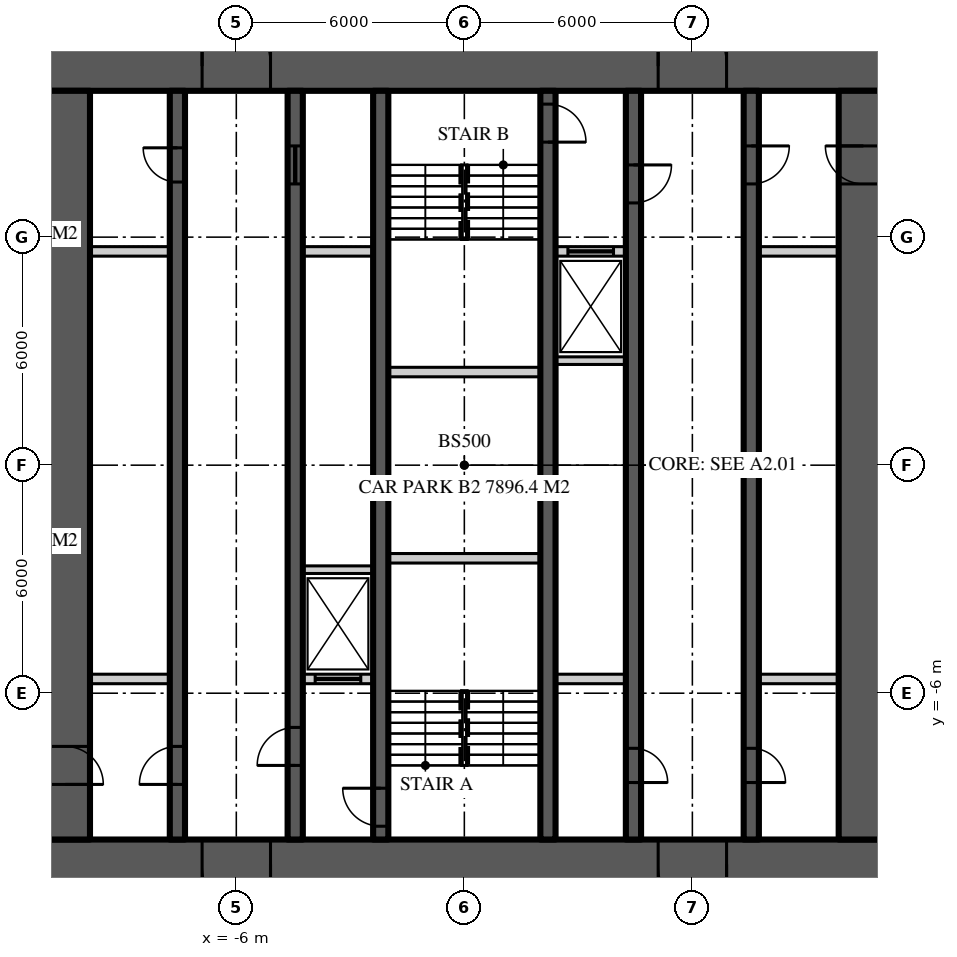
"""IFC4 building model, lengths in metres.
Left out: names, types, materials, properties, quantities, classifications, styles, units other than length and angle.
Written with IfcOpenShell. Run it as: python <this file> out.ifc"""

import sys

from ifc_helpers import new_model, si_unit, direction, frame, frame_2d, origin, place, context, subcontext, project, spatial, rectangle, extrude, element, fill, save


model = new_model("IFC4")
c1 = context("Model", 3, precision=1e-05, world=origin(), true_north=direction((0.0, 1.0)))
c2 = subcontext(c1, "Body", "Model", "MODEL_VIEW")
j1 = project(units=[si_unit("LENGTHUNIT", "METRE"), si_unit("PLANEANGLEUNIT", "RADIAN")], contexts=[c1])
p1 = place(None, origin())
s1 = spatial("IfcSite", under=j1, at=p1, CompositionType="ELEMENT")
p2 = place(p1, origin())
s2 = spatial("IfcBuilding", under=s1, at=p2, CompositionType="ELEMENT")
p3 = place(p2, frame((0.0, 0.0, -10.0)))
s3 = spatial("IfcBuildingStorey", under=s2, at=p3, CompositionType="ELEMENT", Elevation=-10.0)
p4 = place(p3, frame((-11.15, 10.5, 0.0), z_axis=(0.0, 0.0, 1.0), x_axis=(1.0, 0.0, 0.0)))
e1 = element("IfcWall", 1, at=p4, inside=s3, PredefinedType="SHEAR", context=c2, shape_type="SweptSolid", body=[
    extrude(rectangle(XDim=22.3, YDim=1.3, at=frame_2d((11.15, 0.0))), origin(), (0.0, 0.0, 1.0), 5.0),
])
p5 = place(p4, frame((4.25, 0.0, 0.0)))
e2 = element("IfcOpeningElement", 2, at=p5, cuts=e1, PredefinedType="OPENING", context=c2, shape_type="SweptSolid", body=[
    extrude(rectangle(XDim=1.8, YDim=2.2, at=frame_2d((0.9, 1.1))), frame((0.0, 0.66, 0.0), z_axis=(0.0, -1.0, 0.0), x_axis=(1.0, 0.0, 0.0)), (0.0, 0.0, 1.0), 1.32),
])
p6 = place(p4, frame((16.25, 0.0, 0.0)))
e3 = element("IfcOpeningElement", 3, at=p6, cuts=e1, PredefinedType="OPENING", context=c2, shape_type="SweptSolid", body=[
    extrude(rectangle(XDim=1.8, YDim=2.2, at=frame_2d((0.9, 1.1))), frame((0.0, 0.66, 0.0), z_axis=(0.0, -1.0, 0.0), x_axis=(1.0, 0.0, 0.0)), (0.0, 0.0, 1.0), 1.32),
])
p7 = place(p3, frame((11.15, -10.5, 0.0), z_axis=(0.0, 0.0, 1.0), x_axis=(-1.0, 0.0, 0.0)))
e4 = element("IfcWall", 4, at=p7, inside=s3, PredefinedType="SHEAR", context=c2, shape_type="SweptSolid", body=[
    extrude(rectangle(XDim=22.3, YDim=1.3, at=frame_2d((11.15, 0.0))), origin(), (0.0, 0.0, 1.0), 5.0),
])
p8 = place(p7, frame((16.25, 0.0, 0.0)))
e5 = element("IfcOpeningElement", 5, at=p8, cuts=e4, PredefinedType="OPENING", context=c2, shape_type="SweptSolid", body=[
    extrude(rectangle(XDim=1.8, YDim=2.2, at=frame_2d((0.9, 1.1))), frame((0.0, 0.66, 0.0), z_axis=(0.0, -1.0, 0.0), x_axis=(1.0, 0.0, 0.0)), (0.0, 0.0, 1.0), 1.32),
])
p9 = place(p7, frame((4.25, 0.0, 0.0)))
e6 = element("IfcOpeningElement", 6, at=p9, cuts=e4, PredefinedType="OPENING", context=c2, shape_type="SweptSolid", body=[
    extrude(rectangle(XDim=1.8, YDim=2.2, at=frame_2d((0.9, 1.1))), frame((0.0, 0.66, 0.0), z_axis=(0.0, -1.0, 0.0), x_axis=(1.0, 0.0, 0.0)), (0.0, 0.0, 1.0), 1.32),
])
p10 = place(p3, frame((10.5, -9.85, 0.0), z_axis=(0.0, 0.0, 1.0), x_axis=(0.0, 1.0, 0.0)))
e7 = element("IfcWall", 7, at=p10, inside=s3, PredefinedType="SHEAR", context=c2, shape_type="SweptSolid", body=[
    extrude(rectangle(XDim=19.7, YDim=1.3, at=frame_2d((9.85, 0.0))), origin(), (0.0, 0.0, 1.0), 5.0),
])
p11 = place(p10, frame((17.25, 0.0, 0.0)))
e8 = element("IfcOpeningElement", 8, at=p11, cuts=e7, PredefinedType="OPENING", context=c2, shape_type="SweptSolid", body=[
    extrude(rectangle(XDim=1.0, YDim=2.2, at=frame_2d((0.5, 1.1))), frame((0.0, 0.66, 0.0), z_axis=(0.0, -1.0, 0.0), x_axis=(1.0, 0.0, 0.0)), (0.0, 0.0, 1.0), 1.32),
])
p12 = place(p3, frame((-10.5, 9.85, 0.0), z_axis=(0.0, 0.0, 1.0), x_axis=(0.0, -1.0, 0.0)))
e9 = element("IfcWall", 9, at=p12, inside=s3, PredefinedType="SHEAR", context=c2, shape_type="SweptSolid", body=[
    extrude(rectangle(XDim=19.7, YDim=1.3, at=frame_2d((9.85, 0.0))), origin(), (0.0, 0.0, 1.0), 5.0),
])
p13 = place(p12, frame((17.25, 0.0, 0.0)))
e10 = element("IfcOpeningElement", 10, at=p13, cuts=e9, PredefinedType="OPENING", context=c2, shape_type="SweptSolid", body=[
    extrude(rectangle(XDim=1.0, YDim=2.2, at=frame_2d((0.5, 1.1))), frame((0.0, 0.66, 0.0), z_axis=(0.0, -1.0, 0.0), x_axis=(1.0, 0.0, 0.0)), (0.0, 0.0, 1.0), 1.32),
])
p14 = place(p3, frame((-7.55, -9.85, 0.0), z_axis=(0.0, 0.0, 1.0), x_axis=(0.0, 1.0, 0.0)))
e11 = element("IfcWall", 11, at=p14, inside=s3, PredefinedType="SHEAR", context=c2, shape_type="SweptSolid", body=[
    extrude(rectangle(XDim=19.7, YDim=0.4, at=frame_2d((9.85, 0.0))), origin(), (0.0, 0.0, 1.0), 5.0),
])
p15 = place(p14, frame((1.45, 0.0, 0.0)))
e12 = element("IfcOpeningElement", 12, at=p15, cuts=e11, PredefinedType="OPENING", context=c2, shape_type="SweptSolid", body=[
    extrude(rectangle(XDim=1.0, YDim=2.2, at=frame_2d((0.5, 1.1))), frame((0.0, 0.21, 0.0), z_axis=(0.0, -1.0, 0.0), x_axis=(1.0, 0.0, 0.0)), (0.0, 0.0, 1.0), 0.42),
])
p16 = place(p14, frame((17.3, 0.0, 0.0)))
e13 = element("IfcOpeningElement", 13, at=p16, cuts=e11, PredefinedType="OPENING", context=c2, shape_type="SweptSolid", body=[
    extrude(rectangle(XDim=0.9, YDim=2.1, at=frame_2d((0.45, 1.05))), frame((0.0, 0.21, 0.0), z_axis=(0.0, -1.0, 0.0), x_axis=(1.0, 0.0, 0.0)), (0.0, 0.0, 1.0), 0.42),
])
p17 = place(p3, frame((7.55, 9.85, 0.0), z_axis=(0.0, 0.0, 1.0), x_axis=(0.0, -1.0, 0.0)))
e14 = element("IfcWall", 14, at=p17, inside=s3, PredefinedType="SHEAR", context=c2, shape_type="SweptSolid", body=[
    extrude(rectangle(XDim=19.7, YDim=0.4, at=frame_2d((9.85, 0.0))), origin(), (0.0, 0.0, 1.0), 5.0),
])
p18 = place(p17, frame((1.45, 0.0, 0.0)))
e15 = element("IfcOpeningElement", 15, at=p18, cuts=e14, PredefinedType="OPENING", context=c2, shape_type="SweptSolid", body=[
    extrude(rectangle(XDim=1.0, YDim=2.2, at=frame_2d((0.5, 1.1))), frame((0.0, 0.21, 0.0), z_axis=(0.0, -1.0, 0.0), x_axis=(1.0, 0.0, 0.0)), (0.0, 0.0, 1.0), 0.42),
])
p19 = place(p17, frame((17.3, 0.0, 0.0)))
e16 = element("IfcOpeningElement", 16, at=p19, cuts=e14, PredefinedType="OPENING", context=c2, shape_type="SweptSolid", body=[
    extrude(rectangle(XDim=0.9, YDim=2.1, at=frame_2d((0.45, 1.05))), frame((0.0, 0.21, 0.0), z_axis=(0.0, -1.0, 0.0), x_axis=(1.0, 0.0, 0.0)), (0.0, 0.0, 1.0), 0.42),
])
p20 = place(p3, frame((-4.45, -9.85, 0.0), z_axis=(0.0, 0.0, 1.0), x_axis=(0.0, 1.0, 0.0)))
e17 = element("IfcWall", 17, at=p20, inside=s3, PredefinedType="SHEAR", context=c2, shape_type="SweptSolid", body=[
    extrude(rectangle(XDim=19.7, YDim=0.4, at=frame_2d((9.85, 0.0))), origin(), (0.0, 0.0, 1.0), 5.0),
])
p21 = place(p20, frame((1.95, 0.0, 0.0)))
e18 = element("IfcOpeningElement", 18, at=p21, cuts=e17, PredefinedType="OPENING", context=c2, shape_type="SweptSolid", body=[
    extrude(rectangle(XDim=1.0, YDim=2.2, at=frame_2d((0.5, 1.1))), frame((0.0, 0.21, 0.0), z_axis=(0.0, -1.0, 0.0), x_axis=(1.0, 0.0, 0.0)), (0.0, 0.0, 1.0), 0.42),
])
p22 = place(p20, frame((17.25, 0.0, 0.0)))
e19 = element("IfcOpeningElement", 19, at=p22, cuts=e17, PredefinedType="OPENING", context=c2, shape_type="SweptSolid", body=[
    extrude(rectangle(XDim=1.0, YDim=2.1, at=frame_2d((0.5, 1.05))), frame((0.0, 0.21, 0.0), z_axis=(0.0, -1.0, 0.0), x_axis=(1.0, 0.0, 0.0)), (0.0, 0.0, 1.0), 0.42),
])
p23 = place(p3, frame((4.45, 9.85, 0.0), z_axis=(0.0, 0.0, 1.0), x_axis=(0.0, -1.0, 0.0)))
e20 = element("IfcWall", 20, at=p23, inside=s3, PredefinedType="SHEAR", context=c2, shape_type="SweptSolid", body=[
    extrude(rectangle(XDim=19.7, YDim=0.4, at=frame_2d((9.85, 0.0))), origin(), (0.0, 0.0, 1.0), 5.0),
])
p24 = place(p23, frame((1.95, 0.0, 0.0)))
e21 = element("IfcOpeningElement", 21, at=p24, cuts=e20, PredefinedType="OPENING", context=c2, shape_type="SweptSolid", body=[
    extrude(rectangle(XDim=1.0, YDim=2.2, at=frame_2d((0.5, 1.1))), frame((0.0, 0.21, 0.0), z_axis=(0.0, -1.0, 0.0), x_axis=(1.0, 0.0, 0.0)), (0.0, 0.0, 1.0), 0.42),
])
p25 = place(p23, frame((17.3, 0.0, 0.0)))
e22 = element("IfcOpeningElement", 22, at=p25, cuts=e20, PredefinedType="OPENING", context=c2, shape_type="SweptSolid", body=[
    extrude(rectangle(XDim=0.9, YDim=2.1, at=frame_2d((0.45, 1.05))), frame((0.0, 0.21, 0.0), z_axis=(0.0, -1.0, 0.0), x_axis=(1.0, 0.0, 0.0)), (0.0, 0.0, 1.0), 0.42),
])
p26 = place(p3, frame((-2.2, -9.85, 0.0), z_axis=(0.0, 0.0, 1.0), x_axis=(0.0, 1.0, 0.0)))
e23 = element("IfcWall", 23, at=p26, inside=s3, PredefinedType="SHEAR", context=c2, shape_type="SweptSolid", body=[
    extrude(rectangle(XDim=19.7, YDim=0.4, at=frame_2d((9.85, 0.0))), origin(), (0.0, 0.0, 1.0), 5.0),
])
p27 = place(p26, frame((0.35, 0.0, 0.0)))
e24 = element("IfcOpeningElement", 24, at=p27, cuts=e23, PredefinedType="OPENING", context=c2, shape_type="SweptSolid", body=[
    extrude(rectangle(XDim=1.0, YDim=2.2, at=frame_2d((0.5, 1.1))), frame((0.0, 0.21, 0.0), z_axis=(0.0, -1.0, 0.0), x_axis=(1.0, 0.0, 0.0)), (0.0, 0.0, 1.0), 0.42),
])
p28 = place(p3, frame((2.2, 9.85, 0.0), z_axis=(0.0, 0.0, 1.0), x_axis=(0.0, -1.0, 0.0)))
e25 = element("IfcWall", 25, at=p28, inside=s3, PredefinedType="SHEAR", context=c2, shape_type="SweptSolid", body=[
    extrude(rectangle(XDim=19.7, YDim=0.4, at=frame_2d((9.85, 0.0))), origin(), (0.0, 0.0, 1.0), 5.0),
])
p29 = place(p28, frame((0.35, 0.0, 0.0)))
e26 = element("IfcOpeningElement", 26, at=p29, cuts=e25, PredefinedType="OPENING", context=c2, shape_type="SweptSolid", body=[
    extrude(rectangle(XDim=1.0, YDim=2.2, at=frame_2d((0.5, 1.1))), frame((0.0, 0.21, 0.0), z_axis=(0.0, -1.0, 0.0), x_axis=(1.0, 0.0, 0.0)), (0.0, 0.0, 1.0), 0.42),
])
p30 = place(p3, frame((-9.85, 5.625, 0.0), z_axis=(0.0, 0.0, 1.0), x_axis=(1.0, 0.0, 0.0)))
e27 = element("IfcWall", 27, at=p30, inside=s3, PredefinedType="SOLIDWALL", context=c2, shape_type="SweptSolid", body=[
    extrude(rectangle(XDim=2.1, YDim=0.25, at=frame_2d((1.05, 0.0))), origin(), (0.0, 0.0, 1.0), 4.8),
])
p31 = place(p3, frame((-4.25, 5.625, 0.0), z_axis=(0.0, 0.0, 1.0), x_axis=(1.0, 0.0, 0.0)))
e28 = element("IfcWall", 28, at=p31, inside=s3, PredefinedType="SOLIDWALL", context=c2, shape_type="SweptSolid", body=[
    extrude(rectangle(XDim=1.85, YDim=0.25, at=frame_2d((0.925, 0.0))), origin(), (0.0, 0.0, 1.0), 4.8),
])
p32 = place(p3, frame((2.4, 5.625, 0.0), z_axis=(0.0, 0.0, 1.0), x_axis=(1.0, 0.0, 0.0)))
e29 = element("IfcWall", 29, at=p32, inside=s3, PredefinedType="SOLIDWALL", context=c2, shape_type="SweptSolid", body=[
    extrude(rectangle(XDim=1.85, YDim=0.25, at=frame_2d((0.925, 0.0))), origin(), (0.0, 0.0, 1.0), 4.8),
])
p33 = place(p32, frame((0.325, 0.0, 0.0)))
e30 = element("IfcOpeningElement", 30, at=p33, cuts=e29, PredefinedType="OPENING", context=c2, shape_type="SweptSolid", body=[
    extrude(rectangle(XDim=1.2, YDim=2.2, at=frame_2d((0.6, 1.1))), frame((0.0, 0.135, 0.0), z_axis=(0.0, -1.0, 0.0), x_axis=(1.0, 0.0, 0.0)), (0.0, 0.0, 1.0), 0.27),
])
for number, where, z_axis, x_axis in (
    (31, (7.75, 5.625, 0.0), (0.0, 0.0, 1.0), (1.0, 0.0, 0.0)),
    (32, (-9.85, -5.625, 0.0), (0.0, 0.0, 1.0), (1.0, 0.0, 0.0)),
):
    element("IfcWall", number, at=place(p3, frame(where, z_axis=z_axis, x_axis=x_axis)), inside=s3, PredefinedType="SOLIDWALL", context=c2, shape_type="SweptSolid", body=[
        extrude(rectangle(XDim=2.1, YDim=0.25, at=frame_2d((1.05, 0.0))), origin(), (0.0, 0.0, 1.0), 4.8),
    ])
p34 = place(p3, frame((-4.25, -5.625, 0.0), z_axis=(0.0, 0.0, 1.0), x_axis=(1.0, 0.0, 0.0)))
e33 = element("IfcWall", 33, at=p34, inside=s3, PredefinedType="SOLIDWALL", context=c2, shape_type="SweptSolid", body=[
    extrude(rectangle(XDim=1.85, YDim=0.25, at=frame_2d((0.925, 0.0))), origin(), (0.0, 0.0, 1.0), 4.8),
])
p35 = place(p34, frame((0.325, 0.0, 0.0)))
e34 = element("IfcOpeningElement", 34, at=p35, cuts=e33, PredefinedType="OPENING", context=c2, shape_type="SweptSolid", body=[
    extrude(rectangle(XDim=1.2, YDim=2.2, at=frame_2d((0.6, 1.1))), frame((0.0, 0.135, 0.0), z_axis=(0.0, -1.0, 0.0), x_axis=(1.0, 0.0, 0.0)), (0.0, 0.0, 1.0), 0.27),
])
p36 = place(p3, frame((2.4, -5.625, 0.0), z_axis=(0.0, 0.0, 1.0), x_axis=(1.0, 0.0, 0.0)))
e35 = element("IfcWall", 35, at=p36, inside=s3, PredefinedType="SOLIDWALL", context=c2, shape_type="SweptSolid", body=[
    extrude(rectangle(XDim=1.85, YDim=0.25, at=frame_2d((0.925, 0.0))), origin(), (0.0, 0.0, 1.0), 4.8),
])
p37 = place(p3, frame((7.75, -5.625, 0.0), z_axis=(0.0, 0.0, 1.0), x_axis=(1.0, 0.0, 0.0)))
e36 = element("IfcWall", 36, at=p37, inside=s3, PredefinedType="SOLIDWALL", context=c2, shape_type="SweptSolid", body=[
    extrude(rectangle(XDim=2.1, YDim=0.25, at=frame_2d((1.05, 0.0))), origin(), (0.0, 0.0, 1.0), 4.8),
])
for number, where, z_axis, x_axis in (
    (37, (-2.0, -2.45, 0.0), (0.0, 0.0, 1.0), (1.0, 0.0, 0.0)),
    (38, (-2.0, 2.45, 0.0), (0.0, 0.0, 1.0), (1.0, 0.0, 0.0)),
):
    element("IfcWall", number, at=place(p3, frame(where, z_axis=z_axis, x_axis=x_axis)), inside=s3, PredefinedType="SOLIDWALL", context=c2, shape_type="SweptSolid", body=[
        extrude(rectangle(XDim=4.0, YDim=0.25, at=frame_2d((2.0, 0.0))), origin(), (0.0, 0.0, 1.0), 4.8),
    ])
for number, where, z_axis, x_axis in (
    (39, (-4.25, -2.75, 0.0), (0.0, 0.0, 1.0), (1.0, 0.0, 0.0)),
    (40, (2.4, 2.75, 0.0), (0.0, 0.0, 1.0), (1.0, 0.0, 0.0)),
):
    element("IfcWall", number, at=place(p3, frame(where, z_axis=z_axis, x_axis=x_axis)), inside=s3, PredefinedType="SOLIDWALL", context=c2, shape_type="SweptSolid", body=[
        extrude(rectangle(XDim=1.85, YDim=0.2, at=frame_2d((0.925, 0.0))), origin(), (0.0, 0.0, 1.0), 4.8),
    ])
p38 = place(p5, origin())
e41 = element("IfcDoor", 41, at=p38, inside=s3, OperationType="DOUBLE_DOOR_DOUBLE_SWING", PredefinedType="DOOR", context=c2, shape_type="SweptSolid", body=[
    extrude(rectangle(XDim=1.8, YDim=2.2, at=frame_2d((0.9, 1.1))), frame((0.0, 0.025, 0.0), z_axis=(0.0, -1.0, 0.0), x_axis=(1.0, 0.0, 0.0)), (0.0, 0.0, 1.0), 0.05),
])
fill(e2, e41)
p39 = place(p8, origin())
e42 = element("IfcDoor", 42, at=p39, inside=s3, OperationType="DOUBLE_DOOR_DOUBLE_SWING", PredefinedType="DOOR", context=c2, shape_type="SweptSolid", body=[
    extrude(rectangle(XDim=1.8, YDim=2.2, at=frame_2d((0.9, 1.1))), frame((0.0, 0.025, 0.0), z_axis=(0.0, -1.0, 0.0), x_axis=(1.0, 0.0, 0.0)), (0.0, 0.0, 1.0), 0.05),
])
fill(e5, e42)
p40 = place(p6, origin())
e43 = element("IfcDoor", 43, at=p40, inside=s3, OperationType="DOUBLE_DOOR_DOUBLE_SWING", PredefinedType="DOOR", context=c2, shape_type="SweptSolid", body=[
    extrude(rectangle(XDim=1.8, YDim=2.2, at=frame_2d((0.9, 1.1))), frame((0.0, 0.025, 0.0), z_axis=(0.0, -1.0, 0.0), x_axis=(1.0, 0.0, 0.0)), (0.0, 0.0, 1.0), 0.05),
])
fill(e3, e43)
p41 = place(p9, origin())
e44 = element("IfcDoor", 44, at=p41, inside=s3, OperationType="DOUBLE_DOOR_DOUBLE_SWING", PredefinedType="DOOR", context=c2, shape_type="SweptSolid", body=[
    extrude(rectangle(XDim=1.8, YDim=2.2, at=frame_2d((0.9, 1.1))), frame((0.0, 0.025, 0.0), z_axis=(0.0, -1.0, 0.0), x_axis=(1.0, 0.0, 0.0)), (0.0, 0.0, 1.0), 0.05),
])
fill(e6, e44)
p42 = place(p15, origin())
e45 = element("IfcDoor", 45, at=p42, inside=s3, OperationType="SINGLE_SWING_LEFT", PredefinedType="DOOR", context=c2, shape_type="SweptSolid", body=[
    extrude(rectangle(XDim=1.0, YDim=2.2, at=frame_2d((0.5, 1.1))), frame((0.0, 0.025, 0.0), z_axis=(0.0, -1.0, 0.0), x_axis=(1.0, 0.0, 0.0)), (0.0, 0.0, 1.0), 0.05),
])
fill(e12, e45)
p43 = place(p13, origin())
e46 = element("IfcDoor", 46, at=p43, inside=s3, OperationType="SINGLE_SWING_RIGHT", PredefinedType="DOOR", context=c2, shape_type="SweptSolid", body=[
    extrude(rectangle(XDim=1.0, YDim=2.2, at=frame_2d((0.5, 1.1))), frame((0.0, 0.025, 0.0), z_axis=(0.0, -1.0, 0.0), x_axis=(1.0, 0.0, 0.0)), (0.0, 0.0, 1.0), 0.05),
])
fill(e10, e46)
p44 = place(p18, origin())
e47 = element("IfcDoor", 47, at=p44, inside=s3, OperationType="SINGLE_SWING_LEFT", PredefinedType="DOOR", context=c2, shape_type="SweptSolid", body=[
    extrude(rectangle(XDim=1.0, YDim=2.2, at=frame_2d((0.5, 1.1))), frame((0.0, 0.025, 0.0), z_axis=(0.0, -1.0, 0.0), x_axis=(1.0, 0.0, 0.0)), (0.0, 0.0, 1.0), 0.05),
])
fill(e15, e47)
p45 = place(p11, origin())
e48 = element("IfcDoor", 48, at=p45, inside=s3, OperationType="SINGLE_SWING_RIGHT", PredefinedType="DOOR", context=c2, shape_type="SweptSolid", body=[
    extrude(rectangle(XDim=1.0, YDim=2.2, at=frame_2d((0.5, 1.1))), frame((0.0, 0.025, 0.0), z_axis=(0.0, -1.0, 0.0), x_axis=(1.0, 0.0, 0.0)), (0.0, 0.0, 1.0), 0.05),
])
fill(e8, e48)
p46 = place(p21, origin())
e49 = element("IfcDoor", 49, at=p46, inside=s3, OperationType="SINGLE_SWING_LEFT", PredefinedType="DOOR", context=c2, shape_type="SweptSolid", body=[
    extrude(rectangle(XDim=1.0, YDim=2.2, at=frame_2d((0.5, 1.1))), frame((0.0, 0.025, 0.0), z_axis=(0.0, -1.0, 0.0), x_axis=(1.0, 0.0, 0.0)), (0.0, 0.0, 1.0), 0.05),
])
fill(e18, e49)
p47 = place(p27, origin())
e50 = element("IfcDoor", 50, at=p47, inside=s3, OperationType="SINGLE_SWING_RIGHT", PredefinedType="DOOR", context=c2, shape_type="SweptSolid", body=[
    extrude(rectangle(XDim=1.0, YDim=2.2, at=frame_2d((0.5, 1.1))), frame((0.0, 0.025, 0.0), z_axis=(0.0, -1.0, 0.0), x_axis=(1.0, 0.0, 0.0)), (0.0, 0.0, 1.0), 0.05),
])
fill(e24, e50)
p48 = place(p24, origin())
e51 = element("IfcDoor", 51, at=p48, inside=s3, OperationType="SINGLE_SWING_LEFT", PredefinedType="DOOR", context=c2, shape_type="SweptSolid", body=[
    extrude(rectangle(XDim=1.0, YDim=2.2, at=frame_2d((0.5, 1.1))), frame((0.0, 0.025, 0.0), z_axis=(0.0, -1.0, 0.0), x_axis=(1.0, 0.0, 0.0)), (0.0, 0.0, 1.0), 0.05),
])
fill(e21, e51)
p49 = place(p29, origin())
e52 = element("IfcDoor", 52, at=p49, inside=s3, OperationType="SINGLE_SWING_RIGHT", PredefinedType="DOOR", context=c2, shape_type="SweptSolid", body=[
    extrude(rectangle(XDim=1.0, YDim=2.2, at=frame_2d((0.5, 1.1))), frame((0.0, 0.025, 0.0), z_axis=(0.0, -1.0, 0.0), x_axis=(1.0, 0.0, 0.0)), (0.0, 0.0, 1.0), 0.05),
])
fill(e26, e52)
p50 = place(p16, origin())
e53 = element("IfcDoor", 53, at=p50, inside=s3, OperationType="SINGLE_SWING_RIGHT", PredefinedType="DOOR", context=c2, shape_type="SweptSolid", body=[
    extrude(rectangle(XDim=0.9, YDim=2.1, at=frame_2d((0.45, 1.05))), frame((0.0, 0.025, 0.0), z_axis=(0.0, -1.0, 0.0), x_axis=(1.0, 0.0, 0.0)), (0.0, 0.0, 1.0), 0.05),
])
fill(e13, e53)
p51 = place(p22, origin())
e54 = element("IfcDoor", 54, at=p51, inside=s3, OperationType="SLIDING_TO_LEFT", PredefinedType="DOOR", context=c2, shape_type="SweptSolid", body=[
    extrude(rectangle(XDim=1.0, YDim=2.1, at=frame_2d((0.5, 1.05))), frame((0.0, 0.025, 0.0), z_axis=(0.0, -1.0, 0.0), x_axis=(1.0, 0.0, 0.0)), (0.0, 0.0, 1.0), 0.05),
])
fill(e19, e54)
p52 = place(p19, origin())
e55 = element("IfcDoor", 55, at=p52, inside=s3, OperationType="SINGLE_SWING_RIGHT", PredefinedType="DOOR", context=c2, shape_type="SweptSolid", body=[
    extrude(rectangle(XDim=0.9, YDim=2.1, at=frame_2d((0.45, 1.05))), frame((0.0, 0.025, 0.0), z_axis=(0.0, -1.0, 0.0), x_axis=(1.0, 0.0, 0.0)), (0.0, 0.0, 1.0), 0.05),
])
fill(e16, e55)
p53 = place(p25, origin())
e56 = element("IfcDoor", 56, at=p53, inside=s3, OperationType="SINGLE_SWING_RIGHT", PredefinedType="DOOR", context=c2, shape_type="SweptSolid", body=[
    extrude(rectangle(XDim=0.9, YDim=2.1, at=frame_2d((0.45, 1.05))), frame((0.0, 0.025, 0.0), z_axis=(0.0, -1.0, 0.0), x_axis=(1.0, 0.0, 0.0)), (0.0, 0.0, 1.0), 0.05),
])
fill(e22, e56)
p54 = place(p35, origin())
e57 = element("IfcDoor", 57, at=p54, inside=s3, OperationType="SLIDING_TO_LEFT", PredefinedType="DOOR", context=c2, shape_type="SweptSolid", body=[
    extrude(rectangle(XDim=1.2, YDim=2.2, at=frame_2d((0.6, 1.1))), frame((0.0, 0.025, 0.0), z_axis=(0.0, -1.0, 0.0), x_axis=(1.0, 0.0, 0.0)), (0.0, 0.0, 1.0), 0.05),
])
fill(e34, e57)
p55 = place(p33, origin())
e58 = element("IfcDoor", 58, at=p55, inside=s3, OperationType="SLIDING_TO_LEFT", PredefinedType="DOOR", context=c2, shape_type="SweptSolid", body=[
    extrude(rectangle(XDim=1.2, YDim=2.2, at=frame_2d((0.6, 1.1))), frame((0.0, 0.025, 0.0), z_axis=(0.0, -1.0, 0.0), x_axis=(1.0, 0.0, 0.0)), (0.0, 0.0, 1.0), 0.05),
])
fill(e30, e58)
save(model, sys.argv[1])
